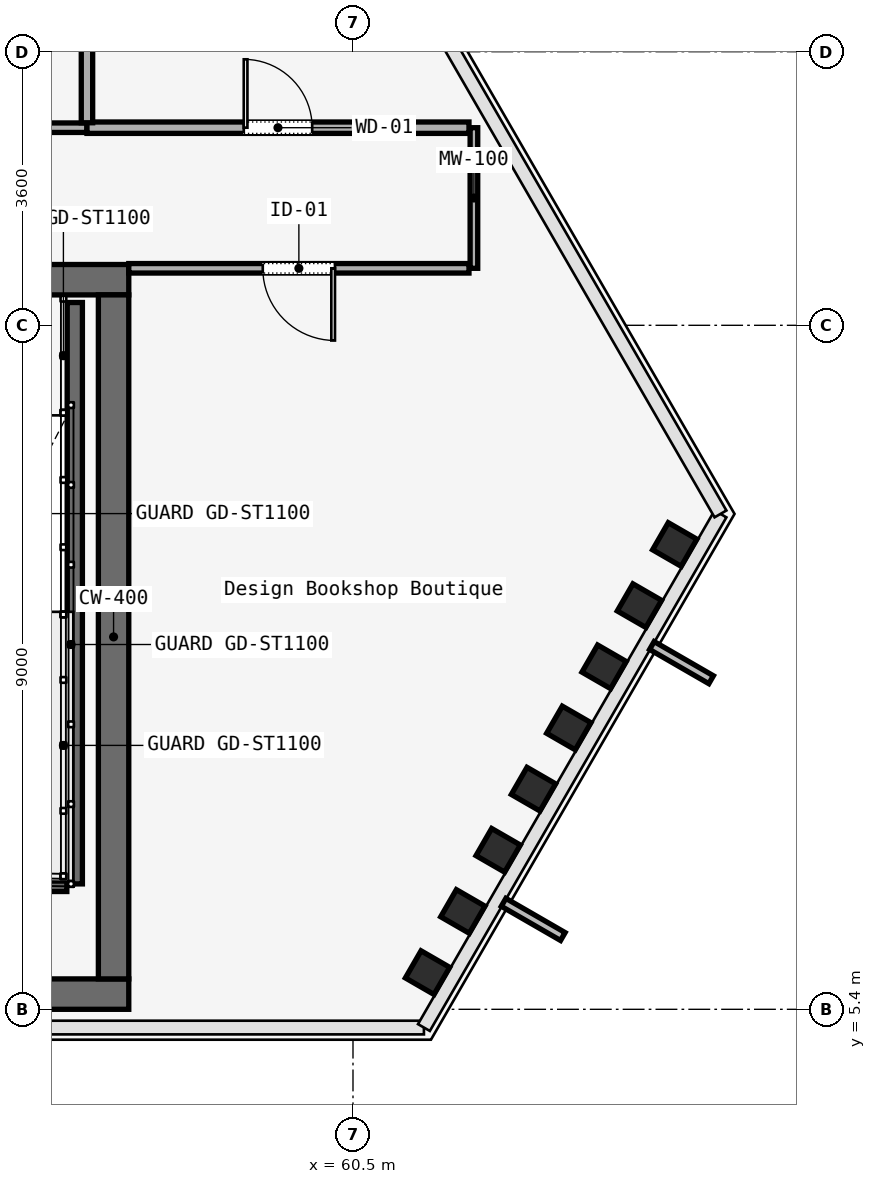
"""IFC4 building model, lengths in metres.
Left out: names, types, materials, properties, quantities, classifications, styles, units other than length and angle.
Written with IfcOpenShell. Run it as: python <this file> out.ifc"""

import sys

from ifc_helpers import new_model, si_unit, direction, frame, frame_2d, origin, origin_2d, place, context, subcontext, project, spatial, rectangle, i_section, extrude, element, fill, save


model = new_model("IFC4")
c1 = context("Model", 3, precision=1e-05, world=origin(), true_north=direction((0.0, 1.0)))
c2 = subcontext(c1, "Body", "Model", "MODEL_VIEW")
j1 = project(units=[si_unit("LENGTHUNIT", "METRE"), si_unit("PLANEANGLEUNIT", "RADIAN")], contexts=[c1])
p1 = place(None, origin())
s1 = spatial("IfcSite", under=j1, at=p1, CompositionType="ELEMENT")
p2 = place(p1, origin())
s2 = spatial("IfcBuilding", under=s1, at=p2, CompositionType="ELEMENT")
p3 = place(p2, frame((0.0, 0.0, 221.8)))
s3 = spatial("IfcBuildingStorey", under=s2, at=p3, CompositionType="ELEMENT", Elevation=221.8)
p4 = place(p3, frame((26.45, 15.0, 0.0), z_axis=(0.0, 0.0, 1.0), x_axis=(1.0, 0.0, 0.0)))
e1 = element("IfcWall", 1, at=p4, inside=s3, PredefinedType="SOLIDWALL", context=c2, shape_type="SweptSolid", body=[
    extrude(rectangle(XDim=31.1, YDim=0.4, at=frame_2d((15.55, 0.0))), origin(), (0.0, 0.0, 1.0), 3.58),
])
p5 = place(p4, frame((1.65, 0.0, 0.0)))
e2 = element("IfcOpeningElement", 2, at=p5, cuts=e1, PredefinedType="OPENING", context=c2, shape_type="SweptSolid", body=[
    extrude(rectangle(XDim=1.1, YDim=2.2, at=frame_2d((0.55, 1.1))), frame((0.0, 0.2, 0.0), z_axis=(0.0, -1.0, 0.0), x_axis=(1.0, 0.0, 0.0)), (0.0, 0.0, 1.0), 0.4),
])
p6 = place(p4, frame((13.65, 0.0, 0.0)))
e3 = element("IfcOpeningElement", 3, at=p6, cuts=e1, PredefinedType="OPENING", context=c2, shape_type="SweptSolid", body=[
    extrude(rectangle(XDim=1.1, YDim=2.2, at=frame_2d((0.55, 1.1))), frame((0.0, 0.2, 0.0), z_axis=(0.0, -1.0, 0.0), x_axis=(1.0, 0.0, 0.0)), (0.0, 0.0, 1.0), 0.4),
])
p7 = place(p4, frame((25.55, 0.0, 0.0)))
e4 = element("IfcOpeningElement", 4, at=p7, cuts=e1, PredefinedType="OPENING", context=c2, shape_type="SweptSolid", body=[
    extrude(rectangle(XDim=1.1, YDim=2.2, at=frame_2d((0.55, 1.1))), frame((0.0, 0.2, 0.0), z_axis=(0.0, -1.0, 0.0), x_axis=(1.0, 0.0, 0.0)), (0.0, 0.0, 1.0), 0.4),
])
p8 = place(p4, frame((19.35, 0.0, 0.0)))
e5 = element("IfcOpeningElement", 5, at=p8, cuts=e1, PredefinedType="OPENING", context=c2, shape_type="SweptSolid", body=[
    extrude(rectangle(XDim=1.1, YDim=2.2, at=frame_2d((0.55, 1.1))), frame((0.0, 0.2, 0.0), z_axis=(0.0, -1.0, 0.0), x_axis=(1.0, 0.0, 0.0)), (0.0, 0.0, 1.0), 0.4),
])
p9 = place(p4, frame((21.4, 0.0, 0.0)))
e6 = element("IfcOpeningElement", 6, at=p9, cuts=e1, PredefinedType="OPENING", context=c2, shape_type="SweptSolid", body=[
    extrude(rectangle(XDim=0.9, YDim=2.1, at=frame_2d((0.45, 1.05))), frame((0.0, 0.2, 0.0), z_axis=(0.0, -1.0, 0.0), x_axis=(1.0, 0.0, 0.0)), (0.0, 0.0, 1.0), 0.4),
])
p10 = place(p4, frame((6.54, 0.0, 0.0)))
e7 = element("IfcOpeningElement", 7, at=p10, cuts=e1, PredefinedType="OPENING", context=c2, shape_type="SweptSolid", body=[
    extrude(rectangle(XDim=0.95, YDim=2.2, at=frame_2d((0.475, 1.1))), frame((0.0, 0.2, 0.0), z_axis=(0.0, -1.0, 0.0), x_axis=(1.0, 0.0, 0.0)), (0.0, 0.0, 1.0), 0.4),
])
p11 = place(p4, frame((10.49, 0.0, 0.0)))
e8 = element("IfcOpeningElement", 8, at=p11, cuts=e1, PredefinedType="OPENING", context=c2, shape_type="SweptSolid", body=[
    extrude(rectangle(XDim=0.95, YDim=2.2, at=frame_2d((0.475, 1.1))), frame((0.0, 0.2, 0.0), z_axis=(0.0, -1.0, 0.0), x_axis=(1.0, 0.0, 0.0)), (0.0, 0.0, 1.0), 0.4),
])
p12 = place(p4, frame((23.35, 0.0, 0.0)))
e9 = element("IfcOpeningElement", 9, at=p12, cuts=e1, PredefinedType="OPENING", context=c2, shape_type="SweptSolid", body=[
    extrude(rectangle(XDim=1.3, YDim=2.3, at=frame_2d((0.65, 1.15))), frame((0.0, 0.2, 0.0), z_axis=(0.0, -1.0, 0.0), x_axis=(1.0, 0.0, 0.0)), (0.0, 0.0, 1.0), 0.4),
])
p13 = place(p3, frame((26.45, 5.6, 0.0), z_axis=(0.0, 0.0, 1.0), x_axis=(1.0, 0.0, 0.0)))
e10 = element("IfcWall", 10, at=p13, inside=s3, PredefinedType="SOLIDWALL", context=c2, shape_type="SweptSolid", body=[
    extrude(rectangle(XDim=31.1, YDim=0.4, at=frame_2d((15.55, 0.0))), origin(), (0.0, 0.0, 1.0), 3.58),
])
p14 = place(p3, frame((57.35, 5.8, 0.0), z_axis=(0.0, 0.0, 1.0), x_axis=(0.0, 1.0, 0.0)))
e11 = element("IfcWall", 11, at=p14, inside=s3, PredefinedType="SOLIDWALL", context=c2, shape_type="SweptSolid", body=[
    extrude(rectangle(XDim=9.0, YDim=0.4, at=frame_2d((4.5, 0.0))), origin(), (0.0, 0.0, 1.0), 3.58),
])
for number, where, z_axis, x_axis in (
    (12, (61.481, 5.882, 0.0), (0.0, 0.0, 1.0), (0.5, 0.866, 0.0)),
    (13, (61.946, 6.687, 0.0), (0.0, 0.0, 1.0), (0.5, 0.866, 0.0)),
    (14, (62.41, 7.492, 0.0), (0.0, 0.0, 1.0), (0.5, 0.866, 0.0)),
    (15, (62.875, 8.297, 0.0), (0.0, 0.0, 1.0), (0.5, 0.866, 0.0)),
    (16, (63.339, 9.102, 0.0), (0.0, 0.0, 1.0), (0.5, 0.866, 0.0)),
    (17, (63.804, 9.906, 0.0), (0.0, 0.0, 1.0), (0.5, 0.866, 0.0)),
    (18, (64.269, 10.711, 0.0), (0.0, 0.0, 1.0), (0.5, 0.866, 0.0)),
    (19, (64.733, 11.516, 0.0), (0.0, 0.0, 1.0), (0.5, 0.866, 0.0)),
):
    element("IfcColumn", number, at=place(p3, frame(where, z_axis=z_axis, x_axis=x_axis)), inside=s3, PredefinedType="COLUMN", context=c2, shape_type="SweptSolid", body=[
        extrude(i_section(OverallWidth=0.412, OverallDepth=0.435, WebThickness=0.036, FlangeThickness=0.044, FilletRadius=0.015, at=origin_2d()), origin(), (0.0, 0.0, 1.0), 3.58),
    ])
p15 = place(p3, frame((56.84, 14.7, 0.0), z_axis=(0.0, 0.0, 1.0), x_axis=(0.0, -1.0, 0.0)))
e20 = element("IfcWall", 20, at=p15, inside=s3, PredefinedType="SOLIDWALL", context=c2, shape_type="SweptSolid", body=[
    extrude(rectangle(XDim=7.65, YDim=0.2, at=frame_2d((3.825, 0.0))), origin(), (0.0, 0.0, 1.0), 3.8),
])
p16 = place(p3, frame((53.62, 7.05, 0.0), z_axis=(0.0, 0.0, 1.0), x_axis=(1.0, 0.0, 0.0)))
e21 = element("IfcWall", 21, at=p16, inside=s3, PredefinedType="SOLIDWALL", context=c2, shape_type="SweptSolid", body=[
    extrude(rectangle(XDim=3.115, YDim=0.2, at=frame_2d((1.558, 0.0))), origin(), (0.0, 0.0, 1.0), 3.8),
])
p17 = place(p3, frame((62.091, 17.0, 0.0), z_axis=(0.0, 0.0, 1.0), x_axis=(0.0, -1.0, 0.0)))
e22 = element("IfcWall", 22, at=p17, inside=s3, PredefinedType="MOVABLE", context=c2, shape_type="SweptSolid", body=[
    extrude(rectangle(XDim=1.85, YDim=0.1, at=frame_2d((0.925, 0.0))), origin(), (0.0, 0.0, 1.0), 3.01),
])
p18 = place(p3, frame((62.026, 15.15, 0.0), z_axis=(0.0, 0.0, 1.0), x_axis=(-1.0, 0.0, 0.0)))
e23 = element("IfcWall", 23, at=p18, inside=s3, PredefinedType="PARTITIONING", context=c2, shape_type="SweptSolid", body=[
    extrude(rectangle(XDim=4.476, YDim=0.125, at=frame_2d((2.238, 0.0))), origin(), (0.0, 0.0, 1.0), 3.01),
])
p19 = place(p18, frame((1.763, 0.0, 0.0)))
e24 = element("IfcOpeningElement", 24, at=p19, cuts=e23, PredefinedType="OPENING", context=c2, shape_type="SweptSolid", body=[
    extrude(rectangle(XDim=0.95, YDim=2.2, at=frame_2d((0.475, 1.1))), frame((0.0, 0.062, 0.0), z_axis=(0.0, -1.0, 0.0), x_axis=(1.0, 0.0, 0.0)), (0.0, 0.0, 1.0), 0.125),
])
p20 = place(p3, frame((51.8, 17.0, 0.0), z_axis=(0.0, 0.0, 1.0), x_axis=(1.0, 0.0, 0.0)))
e25 = element("IfcWall", 25, at=p20, inside=s3, PredefinedType="PARTITIONING", context=c2, shape_type="SweptSolid", body=[
    extrude(rectangle(XDim=5.2, YDim=0.125, at=frame_2d((2.6, 0.0))), origin(), (0.0, 0.0, 1.0), 3.01),
])
p21 = place(p20, frame((2.125, 0.0, 0.0)))
e26 = element("IfcOpeningElement", 26, at=p21, cuts=e25, PredefinedType="OPENING", context=c2, shape_type="SweptSolid", body=[
    extrude(rectangle(XDim=0.95, YDim=2.2, at=frame_2d((0.475, 1.1))), frame((0.0, 0.062, 0.0), z_axis=(0.0, -1.0, 0.0), x_axis=(1.0, 0.0, 0.0)), (0.0, 0.0, 1.0), 0.125),
])
p22 = place(p3, frame((57.0, 17.0, 0.0), z_axis=(0.0, 0.0, 1.0), x_axis=(1.0, 0.0, 0.0)))
e27 = element("IfcWall", 27, at=p22, inside=s3, PredefinedType="PARTITIONING", context=c2, shape_type="SweptSolid", body=[
    extrude(rectangle(XDim=5.026, YDim=0.15, at=frame_2d((2.513, 0.0))), origin(), (0.0, 0.0, 1.0), 3.01),
])
p23 = place(p22, frame((2.063, 0.0, 0.0)))
e28 = element("IfcOpeningElement", 28, at=p23, cuts=e27, PredefinedType="OPENING", context=c2, shape_type="SweptSolid", body=[
    extrude(rectangle(XDim=0.9, YDim=2.15, at=frame_2d((0.45, 1.075))), frame((0.0, 0.075, 0.0), z_axis=(0.0, -1.0, 0.0), x_axis=(1.0, 0.0, 0.0)), (0.0, 0.0, 1.0), 0.15),
])
p24 = place(p3, frame((57.0, 17.065, 0.0), z_axis=(0.0, 0.0, 1.0), x_axis=(0.0, 1.0, 0.0)))
e29 = element("IfcWall", 29, at=p24, inside=s3, PredefinedType="PARTITIONING", context=c2, shape_type="SweptSolid", body=[
    extrude(rectangle(XDim=9.135, YDim=0.15, at=frame_2d((4.567, 0.0))), origin(), (0.0, 0.0, 1.0), 3.01),
])
p25 = place(p19, origin())
e30 = element("IfcDoor", 30, at=p25, inside=s3, OperationType="SINGLE_SWING_LEFT", PredefinedType="DOOR", context=c2, shape_type="SweptSolid", body=[
    extrude(rectangle(XDim=0.95, YDim=2.2, at=frame_2d((0.475, 1.1))), frame((0.0, 0.025, 0.0), z_axis=(0.0, -1.0, 0.0), x_axis=(1.0, 0.0, 0.0)), (0.0, 0.0, 1.0), 0.05),
])
fill(e24, e30)
p26 = place(p23, origin())
e31 = element("IfcDoor", 31, at=p26, inside=s3, OperationType="SINGLE_SWING_RIGHT", PredefinedType="DOOR", context=c2, shape_type="SweptSolid", body=[
    extrude(rectangle(XDim=0.9, YDim=2.15, at=frame_2d((0.45, 1.075))), frame((0.0, 0.025, 0.0), z_axis=(0.0, -1.0, 0.0), x_axis=(1.0, 0.0, 0.0)), (0.0, 0.0, 1.0), 0.05),
])
fill(e28, e31)
save(model, sys.argv[1])
